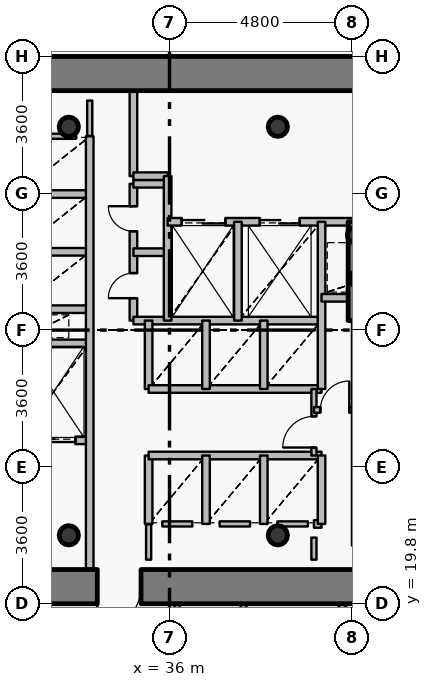
"""IFC4 building model, lengths in metres.
Left out: names, types, materials, properties, quantities, classifications, styles, units other than length and angle.
Written with IfcOpenShell. Run it as: python <this file> out.ifc"""

import sys

from ifc_helpers import new_model, si_unit, direction, frame, frame_2d, origin, origin_2d, place, context, subcontext, project, spatial, rectangle, hollow_circle, extrude, source, transform, mapped, element, fill, save


model = new_model("IFC4")
c1 = context("Model", 3, precision=1e-05, world=origin(), true_north=direction((0.0, 1.0)))
c2 = subcontext(c1, "Body", "Model", "MODEL_VIEW")
j1 = project(units=[si_unit("LENGTHUNIT", "METRE"), si_unit("PLANEANGLEUNIT", "RADIAN")], contexts=[c1])
p1 = place(None, origin())
s1 = spatial("IfcSite", under=j1, at=p1, CompositionType="ELEMENT")
p2 = place(p1, origin())
s2 = spatial("IfcBuilding", under=s1, at=p2, CompositionType="ELEMENT")
p3 = place(p2, frame((0.0, 0.0, 27.0)))
s3 = spatial("IfcBuildingStorey", under=s2, at=p3, CompositionType="ELEMENT", Elevation=27.0)
for number, where, z_axis, x_axis in (
    (1, (33.35, 21.6, 0.0), (0.0, 0.0, 1.0), (1.0, 0.0, 0.0)),
    (2, (38.85, 21.6, 0.0), (0.0, 0.0, 1.0), (1.0, 0.0, 0.0)),
    (3, (38.85, 32.35, 0.0), (0.0, 0.0, 1.0), (1.0, 0.0, 0.0)),
    (4, (33.35, 32.35, 0.0), (0.0, 0.0, 1.0), (1.0, 0.0, 0.0)),
):
    element("IfcColumn", number, at=place(p3, frame(where, z_axis=z_axis, x_axis=x_axis)), inside=s3, PredefinedType="COLUMN", context=c2, shape_type="SweptSolid", body=[
        extrude(hollow_circle(Radius=0.254, WallThickness=0.02, at=origin_2d()), origin(), (0.0, 0.0, 1.0), 5.4),
    ])
for number, where, z_axis, x_axis in (
    (5, (40.95, 28.35, 0.0), (0.0, 0.0, 1.0), (1.0, 0.0, 0.0)),
    (6, (40.88, 29.5, 0.0), (0.0, 0.0, 1.0), (1.0, 0.0, 0.0)),
):
    element("IfcColumn", number, at=place(p3, frame(where, z_axis=z_axis, x_axis=x_axis)), inside=s3, PredefinedType="COLUMN", context=c2, shape_type="SweptSolid", body=[
        extrude(hollow_circle(Radius=0.203, WallThickness=0.016, at=origin_2d()), origin(), (0.0, 0.0, 1.0), 5.4),
    ])
p4 = place(p3, frame((26.75, 33.75, 0.0), z_axis=(0.0, 0.0, 1.0), x_axis=(1.0, 0.0, 0.0)))
e7 = element("IfcWall", 7, at=p4, inside=s3, PredefinedType="SHEAR", context=c2, shape_type="SweptSolid", body=[
    extrude(rectangle(XDim=18.5, YDim=0.9, at=frame_2d((9.25, 0.0))), origin(), (0.0, 0.0, 1.0), 4.6),
])
p5 = place(p3, frame((45.25, 20.25, 0.0), z_axis=(0.0, 0.0, 1.0), x_axis=(-1.0, 0.0, 0.0)))
e8 = element("IfcWall", 8, at=p5, inside=s3, PredefinedType="SHEAR", context=c2, shape_type="SweptSolid", body=[
    extrude(rectangle(XDim=18.5, YDim=0.9, at=frame_2d((9.25, 0.0))), origin(), (0.0, 0.0, 1.0), 4.6),
])
p6 = place(p5, frame((10.0, 0.0, 0.0)))
e9 = element("IfcOpeningElement", 9, at=p6, cuts=e8, PredefinedType="OPENING", context=c2, shape_type="SweptSolid", body=[
    extrude(rectangle(XDim=1.15, YDim=2.15, at=origin_2d()), frame((0.575, 0.46, 1.075), z_axis=(0.0, -1.0, 0.0), x_axis=(1.0, 0.0, 0.0)), (0.0, 0.0, 1.0), 0.92),
])
p7 = place(p3, frame((40.9, 27.25, 0.0), z_axis=(0.0, 0.0, 1.0), x_axis=(0.0, 1.0, 0.0)))
e10 = element("IfcWall", 10, at=p7, inside=s3, PredefinedType="SHEAR", context=c2, shape_type="SweptSolid", body=[
    extrude(rectangle(XDim=2.6, YDim=0.4, at=frame_2d((1.3, 0.0))), origin(), (0.0, 0.0, 1.0), 4.75),
])
p8 = place(p3, frame((32.0, 24.1, 0.0), z_axis=(0.0, 0.0, 1.0), x_axis=(1.0, 0.0, 0.0)))
e11 = element("IfcWall", 11, at=p8, inside=s3, PredefinedType="PARTITIONING", context=c2, shape_type="SweptSolid", body=[
    extrude(rectangle(XDim=1.9, YDim=0.2, at=frame_2d((0.95, 0.0))), origin(), (0.0, 0.0, 1.0), 4.735),
])
p9 = place(p8, frame((0.375, 0.0, 0.0)))
e12 = element("IfcOpeningElement", 12, at=p9, cuts=e11, PredefinedType="OPENING", context=c2, shape_type="SweptSolid", body=[
    extrude(rectangle(XDim=1.15, YDim=2.15, at=origin_2d()), frame((0.575, 0.11, 1.075), z_axis=(0.0, -1.0, 0.0), x_axis=(1.0, 0.0, 0.0)), (0.0, 0.0, 1.0), 0.22),
])
for number, where, z_axis, x_axis in (
    (13, (32.0, 26.65, 0.0), (0.0, 0.0, 1.0), (1.0, 0.0, 0.0)),
    (14, (32.0, 27.55, 0.0), (0.0, 0.0, 1.0), (1.0, 0.0, 0.0)),
    (15, (32.0, 29.06, 0.0), (0.0, 0.0, 1.0), (1.0, 0.0, 0.0)),
    (16, (32.0, 30.58, 0.0), (0.0, 0.0, 1.0), (1.0, 0.0, 0.0)),
):
    element("IfcWall", number, at=place(p3, frame(where, z_axis=z_axis, x_axis=x_axis)), inside=s3, PredefinedType="PARTITIONING", context=c2, shape_type="SweptSolid", body=[
        extrude(rectangle(XDim=1.9, YDim=0.2, at=frame_2d((0.95, 0.0))), origin(), (0.0, 0.0, 1.0), 4.735),
    ])
p10 = place(p3, frame((33.9, 20.7, 0.0), z_axis=(0.0, 0.0, 1.0), x_axis=(0.0, 1.0, 0.0)))
e17 = element("IfcWall", 17, at=p10, inside=s3, PredefinedType="PARTITIONING", context=c2, shape_type="SweptSolid", body=[
    extrude(rectangle(XDim=11.4, YDim=0.2, at=frame_2d((5.7, 0.0))), origin(), (0.0, 0.0, 1.0), 4.735),
])
p11 = place(p3, frame((35.05, 27.25, 0.0), z_axis=(0.0, 0.0, 1.0), x_axis=(0.0, 1.0, 0.0)))
e18 = element("IfcWall", 18, at=p11, inside=s3, PredefinedType="PARTITIONING", context=c2, shape_type="SweptSolid", body=[
    extrude(rectangle(XDim=3.6, YDim=0.2, at=frame_2d((1.8, 0.0))), origin(), (0.0, 0.0, 1.0), 5.15),
])
p12 = place(p11, frame((0.59, 0.0, 0.0)))
e19 = element("IfcOpeningElement", 19, at=p12, cuts=e18, PredefinedType="OPENING", context=c2, shape_type="SweptSolid", body=[
    extrude(rectangle(XDim=0.66, YDim=2.05, at=origin_2d()), frame((0.33, 0.11, 1.025), z_axis=(0.0, -1.0, 0.0), x_axis=(1.0, 0.0, 0.0)), (0.0, 0.0, 1.0), 0.22),
])
p13 = place(p11, frame((2.35, 0.0, 0.0)))
e20 = element("IfcOpeningElement", 20, at=p13, cuts=e18, PredefinedType="OPENING", context=c2, shape_type="SweptSolid", body=[
    extrude(rectangle(XDim=0.66, YDim=2.05, at=origin_2d()), frame((0.33, 0.11, 1.025), z_axis=(0.0, -1.0, 0.0), x_axis=(1.0, 0.0, 0.0)), (0.0, 0.0, 1.0), 0.22),
])
p14 = place(p3, frame((35.05, 27.25, 0.0), z_axis=(0.0, 0.0, 1.0), x_axis=(1.0, 0.0, 0.0)))
e21 = element("IfcWall", 21, at=p14, inside=s3, PredefinedType="PARTITIONING", context=c2, shape_type="SweptSolid", body=[
    extrude(rectangle(XDim=4.95, YDim=0.2, at=frame_2d((2.475, 0.0))), origin(), (0.0, 0.0, 1.0), 4.735),
])
for number, where, z_axis, x_axis in (
    (22, (35.05, 29.05, 0.0), (0.0, 0.0, 1.0), (1.0, 0.0, 0.0)),
    (23, (35.05, 30.85, 0.0), (0.0, 0.0, 1.0), (1.0, 0.0, 0.0)),
):
    element("IfcWall", number, at=place(p3, frame(where, z_axis=z_axis, x_axis=x_axis)), inside=s3, PredefinedType="PARTITIONING", context=c2, shape_type="SweptSolid", body=[
        extrude(rectangle(XDim=0.9, YDim=0.2, at=frame_2d((0.45, 0.0))), origin(), (0.0, 0.0, 1.0), 5.15),
    ])
p15 = place(p3, frame((35.05, 31.05, 0.0), z_axis=(0.0, 0.0, 1.0), x_axis=(0.0, 1.0, 0.0)))
e24 = element("IfcWall", 24, at=p15, inside=s3, PredefinedType="PARTITIONING", context=c2, shape_type="SweptSolid", body=[
    extrude(rectangle(XDim=2.25, YDim=0.2, at=frame_2d((1.125, 0.0))), origin(), (0.0, 0.0, 1.0), 4.735),
])
p16 = place(p3, frame((35.05, 31.05, 0.0), z_axis=(0.0, 0.0, 1.0), x_axis=(1.0, 0.0, 0.0)))
e25 = element("IfcWall", 25, at=p16, inside=s3, PredefinedType="PARTITIONING", context=c2, shape_type="SweptSolid", body=[
    extrude(rectangle(XDim=0.9, YDim=0.2, at=frame_2d((0.45, 0.0))), origin(), (0.0, 0.0, 1.0), 5.15),
])
p17 = place(p3, frame((35.45, 21.9, 0.0), z_axis=(0.0, 0.0, 1.0), x_axis=(0.0, 1.0, 0.0)))
e26 = element("IfcWall", 26, at=p17, inside=s3, PredefinedType="PARTITIONING", context=c2, shape_type="SweptSolid", body=[
    extrude(rectangle(XDim=1.8, YDim=0.2, at=frame_2d((0.9, 0.0))), origin(), (0.0, 0.0, 1.0), 5.15),
])
p18 = place(p3, frame((35.45, 23.7, 0.0), z_axis=(0.0, 0.0, 1.0), x_axis=(1.0, 0.0, 0.0)))
e27 = element("IfcWall", 27, at=p18, inside=s3, PredefinedType="PARTITIONING", context=c2, shape_type="SweptSolid", body=[
    extrude(rectangle(XDim=4.55, YDim=0.2, at=frame_2d((2.275, 0.0))), origin(), (0.0, 0.0, 1.0), 4.735),
])
p19 = place(p3, frame((35.45, 25.45, 0.0), z_axis=(0.0, 0.0, 1.0), x_axis=(0.0, 1.0, 0.0)))
e28 = element("IfcWall", 28, at=p19, inside=s3, PredefinedType="PARTITIONING", context=c2, shape_type="SweptSolid", body=[
    extrude(rectangle(XDim=1.8, YDim=0.2, at=frame_2d((0.9, 0.0))), origin(), (0.0, 0.0, 1.0), 5.15),
])
p20 = place(p3, frame((35.45, 25.45, 0.0), z_axis=(0.0, 0.0, 1.0), x_axis=(1.0, 0.0, 0.0)))
e29 = element("IfcWall", 29, at=p20, inside=s3, PredefinedType="PARTITIONING", context=c2, shape_type="SweptSolid", body=[
    extrude(rectangle(XDim=4.55, YDim=0.2, at=frame_2d((2.275, 0.0))), origin(), (0.0, 0.0, 1.0), 4.735),
])
p21 = place(p3, frame((35.95, 27.25, 0.0), z_axis=(0.0, 0.0, 1.0), x_axis=(0.0, 1.0, 0.0)))
e30 = element("IfcWall", 30, at=p21, inside=s3, PredefinedType="PARTITIONING", context=c2, shape_type="SweptSolid", body=[
    extrude(rectangle(XDim=3.8, YDim=0.2, at=frame_2d((1.9, 0.0))), origin(), (0.0, 0.0, 1.0), 5.15),
])
p22 = place(p3, frame((35.95, 29.85, 0.0), z_axis=(0.0, 0.0, 1.0), x_axis=(1.0, 0.0, 0.0)))
e31 = element("IfcWall", 31, at=p22, inside=s3, PredefinedType="PARTITIONING", context=c2, shape_type="SweptSolid", body=[
    extrude(rectangle(XDim=8.49, YDim=0.2, at=frame_2d((4.245, 0.0))), origin(), (0.0, 0.0, 1.0), 4.735),
])
p23 = place(p22, frame((6.1, 0.0, 0.0)))
e32 = element("IfcOpeningElement", 32, at=p23, cuts=e31, PredefinedType="OPENING", context=c2, shape_type="SweptSolid", body=[
    extrude(rectangle(XDim=1.2, YDim=2.15, at=origin_2d()), frame((0.6, 0.11, 1.075), z_axis=(0.0, -1.0, 0.0), x_axis=(1.0, 0.0, 0.0)), (0.0, 0.0, 1.0), 0.22),
])
p24 = place(p22, frame((0.37, 0.0, 0.0)))
e33 = element("IfcOpeningElement", 33, at=p24, cuts=e31, PredefinedType="OPENING", context=c2, shape_type="SweptSolid", body=[
    extrude(rectangle(XDim=1.15, YDim=2.15, at=origin_2d()), frame((0.575, 0.11, 1.075), z_axis=(0.0, -1.0, 0.0), x_axis=(1.0, 0.0, 0.0)), (0.0, 0.0, 1.0), 0.22),
])
p25 = place(p22, frame((2.425, 0.0, 0.0)))
e34 = element("IfcOpeningElement", 34, at=p25, cuts=e31, PredefinedType="OPENING", context=c2, shape_type="SweptSolid", body=[
    extrude(rectangle(XDim=1.05, YDim=2.15, at=origin_2d()), frame((0.525, 0.11, 1.075), z_axis=(0.0, -1.0, 0.0), x_axis=(1.0, 0.0, 0.0)), (0.0, 0.0, 1.0), 0.22),
])
p26 = place(p3, frame((36.2, 17.9, 0.0), z_axis=(0.0, 0.0, 1.0), x_axis=(0.0, 1.0, 0.0)))
e35 = element("IfcWall", 35, at=p26, inside=s3, PredefinedType="PARTITIONING", context=c2, shape_type="SweptSolid", body=[
    extrude(rectangle(XDim=1.9, YDim=0.135, at=frame_2d((0.95, 0.0))), origin(), (0.0, 0.0, 1.0), 3.185),
])
for number, where, z_axis, x_axis in (
    (36, (36.96, 21.9, 0.0), (0.0, 0.0, 1.0), (0.0, 1.0, 0.0)),
    (37, (36.96, 25.45, 0.0), (0.0, 0.0, 1.0), (0.0, 1.0, 0.0)),
):
    element("IfcWall", number, at=place(p3, frame(where, z_axis=z_axis, x_axis=x_axis)), inside=s3, PredefinedType="PARTITIONING", context=c2, shape_type="SweptSolid", body=[
        extrude(rectangle(XDim=1.8, YDim=0.2, at=frame_2d((0.9, 0.0))), origin(), (0.0, 0.0, 1.0), 5.15),
    ])
p27 = place(p3, frame((37.8, 27.25, 0.0), z_axis=(0.0, 0.0, 1.0), x_axis=(0.0, 1.0, 0.0)))
e38 = element("IfcWall", 38, at=p27, inside=s3, PredefinedType="PARTITIONING", context=c2, shape_type="SweptSolid", body=[
    extrude(rectangle(XDim=2.6, YDim=0.2, at=frame_2d((1.3, 0.0))), origin(), (0.0, 0.0, 1.0), 5.15),
])
p28 = place(p3, frame((37.929, 19.8, 0.0), z_axis=(0.0, 0.0, 1.0), x_axis=(0.258828999451, -0.965923158974, 0.0)))
e39 = element("IfcWall", 39, at=p28, inside=s3, PredefinedType="PARTITIONING", context=c2, shape_type="SweptSolid", body=[
    extrude(rectangle(XDim=11.645, YDim=0.15, at=frame_2d((5.823, 0.0))), origin(), (0.0, 0.0, 1.0), 4.635),
])
p29 = place(p28, frame((2.36, 0.0, 0.0)))
e40 = element("IfcOpeningElement", 40, at=p29, cuts=e39, PredefinedType="OPENING", context=c2, shape_type="SweptSolid", body=[
    extrude(rectangle(XDim=0.82, YDim=2.1, at=origin_2d()), frame((0.41, 0.085, 1.05), z_axis=(0.0, -1.0, 0.0), x_axis=(1.0, 0.0, 0.0)), (0.0, 0.0, 1.0), 0.17),
])
p30 = place(p28, frame((8.028, 0.0, 0.0)))
e41 = element("IfcOpeningElement", 41, at=p30, cuts=e39, PredefinedType="OPENING", context=c2, shape_type="SweptSolid", body=[
    extrude(rectangle(XDim=1.05, YDim=2.15, at=origin_2d()), frame((0.525, 0.085, 1.075), z_axis=(0.0, -1.0, 0.0), x_axis=(1.0, 0.0, 0.0)), (0.0, 0.0, 1.0), 0.17),
])
for number, where, z_axis, x_axis in (
    (42, (38.48, 21.9, 0.0), (0.0, 0.0, 1.0), (0.0, 1.0, 0.0)),
    (43, (38.48, 25.45, 0.0), (0.0, 0.0, 1.0), (0.0, 1.0, 0.0)),
):
    element("IfcWall", number, at=place(p3, frame(where, z_axis=z_axis, x_axis=x_axis)), inside=s3, PredefinedType="PARTITIONING", context=c2, shape_type="SweptSolid", body=[
        extrude(rectangle(XDim=1.8, YDim=0.2, at=frame_2d((0.9, 0.0))), origin(), (0.0, 0.0, 1.0), 5.15),
    ])
p31 = place(p3, frame((39.8, 21.9, 0.0), z_axis=(0.0, 0.0, 1.0), x_axis=(1.0, 0.0, 0.0)))
e44 = element("IfcWall", 44, at=p31, inside=s3, PredefinedType="PARTITIONING", context=c2, shape_type="SweptSolid", body=[
    extrude(rectangle(XDim=0.2, YDim=0.2, at=frame_2d((0.1, 0.0))), origin(), (0.0, 0.0, 1.0), 5.15),
])
p32 = place(p3, frame((39.8, 23.7, 0.0), z_axis=(0.0, 0.0, 1.0), x_axis=(0.0, 1.0, 0.0)))
e45 = element("IfcWall", 45, at=p32, inside=s3, PredefinedType="PARTITIONING", context=c2, shape_type="SweptSolid", body=[
    extrude(rectangle(XDim=1.75, YDim=0.135, at=frame_2d((0.875, 0.0))), origin(), (0.0, 0.0, 1.0), 5.15),
])
p33 = place(p32, frame((0.21, 0.0, 0.0)))
e46 = element("IfcOpeningElement", 46, at=p33, cuts=e45, PredefinedType="OPENING", context=c2, shape_type="SweptSolid", body=[
    extrude(rectangle(XDim=0.82, YDim=2.1, at=origin_2d()), frame((0.41, 0.078, 1.05), z_axis=(0.0, -1.0, 0.0), x_axis=(1.0, 0.0, 0.0)), (0.0, 0.0, 1.0), 0.155),
])
p34 = place(p3, frame((39.8, 24.9, 0.0), z_axis=(0.0, 0.0, 1.0), x_axis=(1.0, 0.0, 0.0)))
e47 = element("IfcWall", 47, at=p34, inside=s3, PredefinedType="PARTITIONING", context=c2, shape_type="SweptSolid", body=[
    extrude(rectangle(XDim=1.1, YDim=0.15, at=frame_2d((0.55, 0.0))), origin(), (0.0, 0.0, 1.0), 5.15),
])
p35 = place(p34, frame((0.17, 0.0, 0.0)))
e48 = element("IfcOpeningElement", 48, at=p35, cuts=e47, PredefinedType="OPENING", context=c2, shape_type="SweptSolid", body=[
    extrude(rectangle(XDim=0.76, YDim=2.1, at=origin_2d()), frame((0.38, 0.085, 1.05), z_axis=(0.0, -1.0, 0.0), x_axis=(1.0, 0.0, 0.0)), (0.0, 0.0, 1.0), 0.17),
])
p36 = place(p3, frame((40.0, 21.9, 0.0), z_axis=(0.0, 0.0, 1.0), x_axis=(0.0, 1.0, 0.0)))
e49 = element("IfcWall", 49, at=p36, inside=s3, PredefinedType="PARTITIONING", context=c2, shape_type="SweptSolid", body=[
    extrude(rectangle(XDim=1.8, YDim=0.2, at=frame_2d((0.9, 0.0))), origin(), (0.0, 0.0, 1.0), 5.15),
])
p37 = place(p3, frame((40.0, 25.45, 0.0), z_axis=(0.0, 0.0, 1.0), x_axis=(0.0, 1.0, 0.0)))
e50 = element("IfcWall", 50, at=p37, inside=s3, PredefinedType="PARTITIONING", context=c2, shape_type="SweptSolid", body=[
    extrude(rectangle(XDim=4.4, YDim=0.2, at=frame_2d((2.2, 0.0))), origin(), (0.0, 0.0, 1.0), 5.15),
])
p38 = place(p3, frame((40.0, 27.85, 0.0), z_axis=(0.0, 0.0, 1.0), x_axis=(1.0, 0.0, 0.0)))
e51 = element("IfcWall", 51, at=p38, inside=s3, PredefinedType="PARTITIONING", context=c2, shape_type="SweptSolid", body=[
    extrude(rectangle(XDim=0.9, YDim=0.2, at=frame_2d((0.45, 0.0))), origin(), (0.0, 0.0, 1.0), 5.15),
])
p39 = place(p3, frame((40.499, 19.8, 0.0), z_axis=(0.0, 0.0, 1.0), x_axis=(0.529917315657, -0.848049313759, 0.0)))
e52 = element("IfcWall", 52, at=p39, inside=s3, PredefinedType="PARTITIONING", context=c2, shape_type="SweptSolid", body=[
    extrude(rectangle(XDim=11.561, YDim=0.15, at=frame_2d((5.781, 0.0))), origin(), (0.0, 0.0, 1.0), 5.15),
])
p40 = place(p3, frame((40.9, 21.33, 0.0), z_axis=(0.0, 0.0, 1.0), x_axis=(0.0, 1.0, 0.0)))
e53 = element("IfcWall", 53, at=p40, inside=s3, PredefinedType="PARTITIONING", context=c2, shape_type="SweptSolid", body=[
    extrude(rectangle(XDim=5.91, YDim=0.2, at=frame_2d((2.955, 0.0))), origin(), (0.0, 0.0, 1.0), 4.685),
])
p41 = place(p3, frame((36.6, 21.9, 0.0), z_axis=(0.0, 0.0, 1.0), x_axis=(-1.0, 0.0, 0.0)))
e54 = element("IfcWall", 54, at=p41, inside=s3, PredefinedType="PARTITIONING", context=c2, shape_type="SweptSolid", body=[
    extrude(rectangle(XDim=0.79, YDim=0.135, at=frame_2d((0.395, 0.0))), origin(), (0.0, 0.0, 1.0), 5.15),
])
p42 = place(p3, frame((38.12, 21.9, 0.0), z_axis=(0.0, 0.0, 1.0), x_axis=(-1.0, 0.0, 0.0)))
e55 = element("IfcWall", 55, at=p42, inside=s3, PredefinedType="PARTITIONING", context=c2, shape_type="SweptSolid", body=[
    extrude(rectangle(XDim=0.8, YDim=0.135, at=frame_2d((0.4, 0.0))), origin(), (0.0, 0.0, 1.0), 5.15),
])
p43 = place(p3, frame((39.64, 21.9, 0.0), z_axis=(0.0, 0.0, 1.0), x_axis=(-1.0, 0.0, 0.0)))
e56 = element("IfcWall", 56, at=p43, inside=s3, PredefinedType="PARTITIONING", context=c2, shape_type="SweptSolid", body=[
    extrude(rectangle(XDim=0.8, YDim=0.135, at=frame_2d((0.4, 0.0))), origin(), (0.0, 0.0, 1.0), 4.735),
])
p44 = place(p3, frame((32.36, 32.1, 0.0), z_axis=(0.0, 0.0, 1.0), x_axis=(1.0, 0.0, 0.0)))
e57 = element("IfcWall", 57, at=p44, inside=s3, PredefinedType="PARTITIONING", context=c2, shape_type="SweptSolid", body=[
    extrude(rectangle(XDim=1.18, YDim=0.135, at=frame_2d((0.59, 0.0))), origin(), (0.0, 0.0, 1.0), 4.735),
])
p45 = place(p3, frame((39.8, 20.96, 0.0), z_axis=(0.0, 0.0, 1.0), x_axis=(0.0, 1.0, 0.0)))
e58 = element("IfcWall", 58, at=p45, inside=s3, PredefinedType="PARTITIONING", context=c2, shape_type="SweptSolid", body=[
    extrude(rectangle(XDim=0.58, YDim=0.135, at=frame_2d((0.29, 0.0))), origin(), (0.0, 0.0, 1.0), 4.685),
])
for number, where, z_axis, x_axis in (
    (59, (35.45, 21.89, 0.0), (0.0, 0.0, 1.0), (0.0, -1.0, 0.0)),
    (60, (33.9, 32.11, 0.0), (0.0, 0.0, 1.0), (0.0, 1.0, 0.0)),
):
    element("IfcWall", number, at=place(p3, frame(where, z_axis=z_axis, x_axis=x_axis)), inside=s3, PredefinedType="PARTITIONING", context=c2, shape_type="SweptSolid", body=[
        extrude(rectangle(XDim=0.93, YDim=0.135, at=frame_2d((0.465, 0.0))), origin(), (0.0, 0.0, 1.0), 4.735),
    ])
m1 = source(origin(), c2, "Body", "SweptSolid", [
    extrude(rectangle(XDim=1.15, YDim=2.15, at=origin_2d()), frame((0.575, 0.025, 1.075), z_axis=(0.0, -1.0, 0.0), x_axis=(1.0, 0.0, 0.0)), (0.0, 0.0, 1.0), 0.05),
])
p46 = place(p6, origin())
e61 = element("IfcDoor", 61, at=p46, inside=s3, OperationType="SINGLE_SWING_RIGHT", PredefinedType="DOOR", context=c2, shape_type="MappedRepresentation", body=[
    mapped(m1, transform((0.0, 0.0, 0.0), x_axis=(1.0, 0.0, 0.0), y_axis=(0.0, 1.0, 0.0), z_axis=(0.0, 0.0, 1.0), scale=1.0)),
])
fill(e9, e61)
m2 = source(origin(), c2, "Body", "SweptSolid", [
    extrude(rectangle(XDim=1.15, YDim=2.15, at=origin_2d()), frame((0.575, 0.025, 1.075), z_axis=(0.0, -1.0, 0.0), x_axis=(1.0, 0.0, 0.0)), (0.0, 0.0, 1.0), 0.05),
])
p47 = place(p24, origin())
e62 = element("IfcDoor", 62, at=p47, inside=s3, OperationType="DOUBLE_DOOR_SLIDING", PredefinedType="USERDEFINED", context=c2, shape_type="MappedRepresentation", body=[
    mapped(m2, transform((0.0, 0.0, 0.0), x_axis=(1.0, 0.0, 0.0), y_axis=(0.0, 1.0, 0.0), z_axis=(0.0, 0.0, 1.0), scale=1.0)),
])
fill(e33, e62)
p48 = place(p9, origin())
e63 = element("IfcDoor", 63, at=p48, inside=s3, OperationType="DOUBLE_DOOR_SLIDING", PredefinedType="USERDEFINED", context=c2, shape_type="MappedRepresentation", body=[
    mapped(m2, transform((0.0, 0.0, 0.0), x_axis=(1.0, 0.0, 0.0), y_axis=(0.0, 1.0, 0.0), z_axis=(0.0, 0.0, 1.0), scale=1.0)),
])
fill(e12, e63)
m3 = source(origin(), c2, "Body", "SweptSolid", [
    extrude(rectangle(XDim=1.05, YDim=2.15, at=origin_2d()), frame((0.525, 0.025, 1.075), z_axis=(0.0, -1.0, 0.0), x_axis=(1.0, 0.0, 0.0)), (0.0, 0.0, 1.0), 0.05),
])
p49 = place(p25, origin())
e64 = element("IfcDoor", 64, at=p49, inside=s3, OperationType="DOUBLE_DOOR_SLIDING", PredefinedType="USERDEFINED", context=c2, shape_type="MappedRepresentation", body=[
    mapped(m3, transform((0.0, 0.0, 0.0), x_axis=(1.0, 0.0, 0.0), y_axis=(0.0, 1.0, 0.0), z_axis=(0.0, 0.0, 1.0), scale=1.0)),
])
fill(e34, e64)
m4 = source(origin(), c2, "Body", "SweptSolid", [
    extrude(rectangle(XDim=0.66, YDim=2.05, at=origin_2d()), frame((0.33, 0.025, 1.025), z_axis=(0.0, -1.0, 0.0), x_axis=(1.0, 0.0, 0.0)), (0.0, 0.0, 1.0), 0.05),
])
p50 = place(p12, origin())
e65 = element("IfcDoor", 65, at=p50, inside=s3, OperationType="SINGLE_SWING_LEFT", PredefinedType="USERDEFINED", context=c2, shape_type="MappedRepresentation", body=[
    mapped(m4, transform((0.0, 0.0, 0.0), x_axis=(1.0, 0.0, 0.0), y_axis=(0.0, 1.0, 0.0), z_axis=(0.0, 0.0, 1.0), scale=1.0)),
])
fill(e19, e65)
p51 = place(p13, origin())
e66 = element("IfcDoor", 66, at=p51, inside=s3, OperationType="SINGLE_SWING_RIGHT", PredefinedType="USERDEFINED", context=c2, shape_type="MappedRepresentation", body=[
    mapped(m4, transform((0.0, 0.0, 0.0), x_axis=(1.0, 0.0, 0.0), y_axis=(0.0, 1.0, 0.0), z_axis=(0.0, 0.0, 1.0), scale=1.0)),
])
fill(e20, e66)
m5 = source(origin(), c2, "Body", "SweptSolid", [
    extrude(rectangle(XDim=0.82, YDim=2.1, at=origin_2d()), frame((0.41, 0.025, 1.05), z_axis=(0.0, -1.0, 0.0), x_axis=(1.0, 0.0, 0.0)), (0.0, 0.0, 1.0), 0.05),
])
p52 = place(p33, origin())
e67 = element("IfcDoor", 67, at=p52, inside=s3, OperationType="SINGLE_SWING_LEFT", PredefinedType="DOOR", context=c2, shape_type="MappedRepresentation", body=[
    mapped(m5, transform((0.0, 0.0, 0.0), x_axis=(1.0, 0.0, 0.0), y_axis=(0.0, 1.0, 0.0), z_axis=(0.0, 0.0, 1.0), scale=1.0)),
])
fill(e46, e67)
m6 = source(origin(), c2, "Body", "SweptSolid", [
    extrude(rectangle(XDim=0.76, YDim=2.1, at=origin_2d()), frame((0.38, 0.025, 1.05), z_axis=(0.0, -1.0, 0.0), x_axis=(1.0, 0.0, 0.0)), (0.0, 0.0, 1.0), 0.05),
])
p53 = place(p35, origin())
e68 = element("IfcDoor", 68, at=p53, inside=s3, OperationType="SINGLE_SWING_RIGHT", PredefinedType="DOOR", context=c2, shape_type="MappedRepresentation", body=[
    mapped(m6, transform((0.0, 0.0, 0.0), x_axis=(1.0, 0.0, 0.0), y_axis=(0.0, 1.0, 0.0), z_axis=(0.0, 0.0, 1.0), scale=1.0)),
])
fill(e48, e68)
save(model, sys.argv[1])
